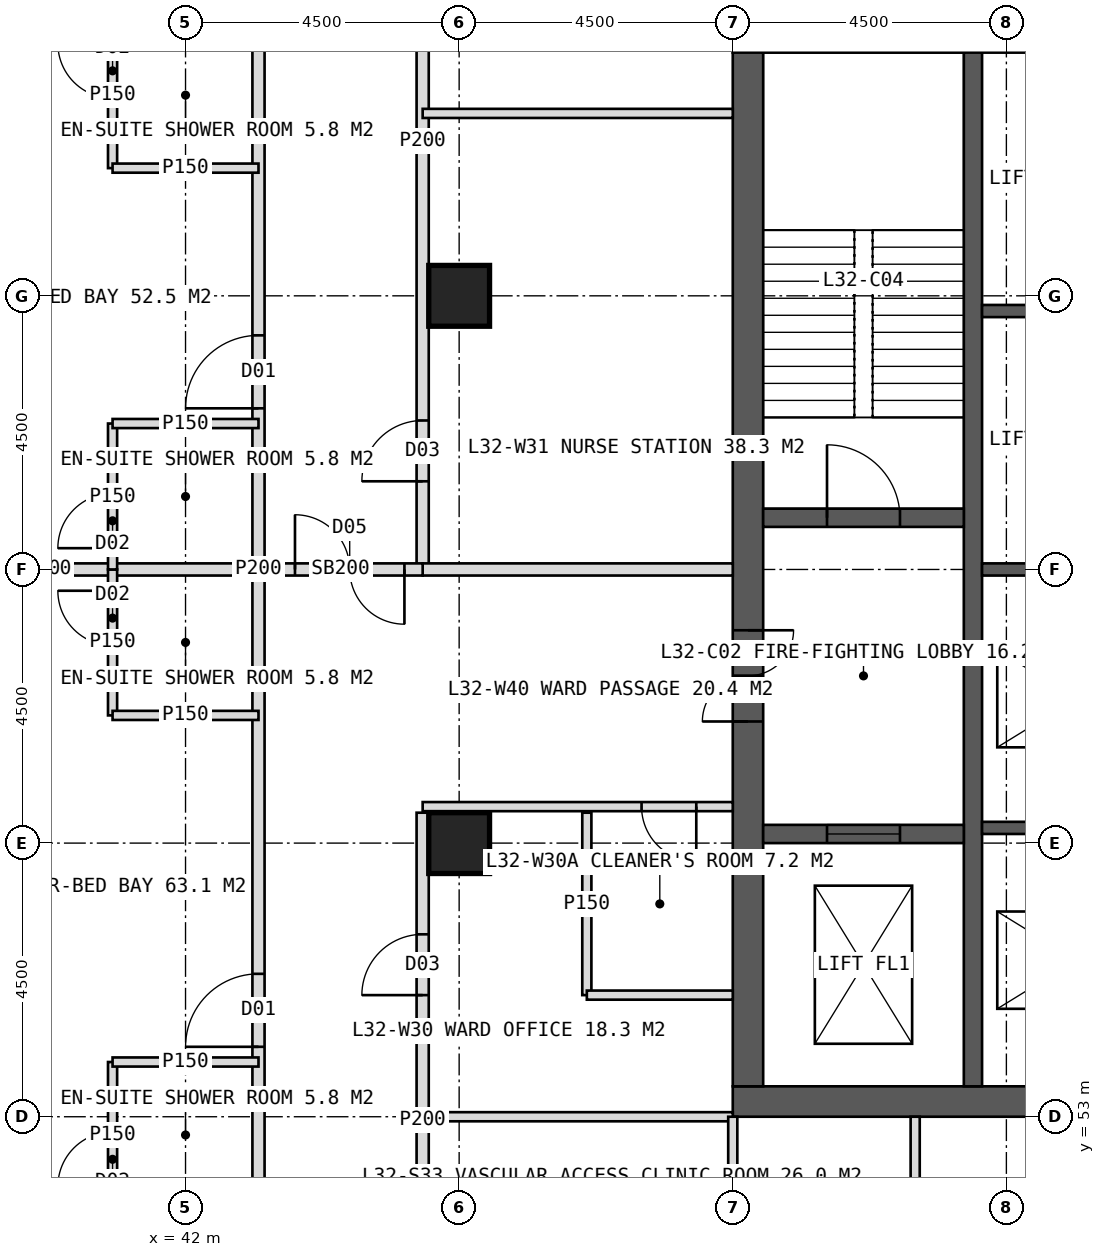
"""IFC4 building model, lengths in metres.
Left out: names, types, materials, properties, quantities, classifications, styles, units other than length and angle.
Written with IfcOpenShell. Run it as: python <this file> out.ifc"""

import sys

from ifc_helpers import new_model, si_unit, direction, frame, frame_2d, origin, origin_2d, place, context, subcontext, project, spatial, rectangle, hollow_rectangle, extrude, element, fill, save


model = new_model("IFC4")
c1 = context("Model", 3, precision=1e-05, world=origin(), true_north=direction((0.0, 1.0)))
c2 = subcontext(c1, "Body", "Model", "MODEL_VIEW")
j1 = project(units=[si_unit("LENGTHUNIT", "METRE"), si_unit("PLANEANGLEUNIT", "RADIAN")], contexts=[c1])
p1 = place(None, origin())
s1 = spatial("IfcSite", under=j1, at=p1, CompositionType="ELEMENT")
p2 = place(p1, origin())
s2 = spatial("IfcBuilding", under=s1, at=p2, CompositionType="ELEMENT")
p3 = place(p2, frame((0.0, 0.0, 136.0)))
s3 = spatial("IfcBuildingStorey", under=s2, at=p3, CompositionType="ELEMENT", Elevation=136.0)
p4 = place(p3, frame((51.0, 53.25, 0.0), z_axis=(0.0, 0.0, 1.0), x_axis=(1.0, 0.0, 0.0)))
e1 = element("IfcWall", 1, at=p4, inside=s3, PredefinedType="SHEAR", context=c2, shape_type="SweptSolid", body=[
    extrude(rectangle(XDim=18.0, YDim=0.5, at=frame_2d((9.0, 0.0))), origin(), (0.0, 0.0, 1.0), 4.0),
])
p5 = place(p4, frame((8.1, 0.0, 0.0)))
e2 = element("IfcOpeningElement", 2, at=p5, cuts=e1, PredefinedType="OPENING", context=c2, shape_type="SweptSolid", body=[
    extrude(rectangle(XDim=1.8, YDim=2.2, at=frame_2d((0.9, 1.1))), frame((0.0, 0.26, 0.0), z_axis=(0.0, -1.0, 0.0), x_axis=(1.0, 0.0, 0.0)), (0.0, 0.0, 1.0), 0.52),
])
p6 = place(p3, frame((51.25, 53.5, 0.0), z_axis=(0.0, 0.0, 1.0), x_axis=(0.0, 1.0, 0.0)))
e3 = element("IfcWall", 3, at=p6, inside=s3, PredefinedType="SHEAR", context=c2, shape_type="SweptSolid", body=[
    extrude(rectangle(XDim=17.0, YDim=0.5, at=frame_2d((8.5, 0.0))), origin(), (0.0, 0.0, 1.0), 4.0),
])
p7 = place(p6, frame((6.0, 0.0, 0.0)))
e4 = element("IfcOpeningElement", 4, at=p7, cuts=e3, PredefinedType="OPENING", context=c2, shape_type="SweptSolid", body=[
    extrude(rectangle(XDim=1.5, YDim=2.2, at=frame_2d((0.75, 1.1))), frame((0.0, 0.26, 0.0), z_axis=(0.0, -1.0, 0.0), x_axis=(1.0, 0.0, 0.0)), (0.0, 0.0, 1.0), 0.52),
])
p8 = place(p3, frame((54.95, 53.5, 0.0), z_axis=(0.0, 0.0, 1.0), x_axis=(0.0, 1.0, 0.0)))
e5 = element("IfcWall", 5, at=p8, inside=s3, PredefinedType="SHEAR", context=c2, shape_type="SweptSolid", body=[
    extrude(rectangle(XDim=17.0, YDim=0.3, at=frame_2d((8.5, 0.0))), origin(), (0.0, 0.0, 1.0), 4.0),
])
for number, where, z_axis, x_axis in (
    (6, (55.1, 57.75, 0.0), (0.0, 0.0, 1.0), (1.0, 0.0, 0.0)),
    (7, (55.1, 62.0, 0.0), (0.0, 0.0, 1.0), (1.0, 0.0, 0.0)),
    (8, (55.1, 66.25, 0.0), (0.0, 0.0, 1.0), (1.0, 0.0, 0.0)),
):
    element("IfcWall", number, at=place(p3, frame(where, z_axis=z_axis, x_axis=x_axis)), inside=s3, PredefinedType="SHEAR", context=c2, shape_type="SweptSolid", body=[
        extrude(rectangle(XDim=3.05, YDim=0.2, at=frame_2d((1.525, 0.0))), origin(), (0.0, 0.0, 1.0), 4.0),
    ])
p9 = place(p3, frame((51.5, 62.85, 0.0), z_axis=(0.0, 0.0, 1.0), x_axis=(1.0, 0.0, 0.0)))
e9 = element("IfcWall", 9, at=p9, inside=s3, PredefinedType="SHEAR", context=c2, shape_type="SweptSolid", body=[
    extrude(rectangle(XDim=3.3, YDim=0.3, at=frame_2d((1.65, 0.0))), origin(), (0.0, 0.0, 1.0), 4.0),
])
p10 = place(p9, frame((1.05, 0.0, 0.0)))
e10 = element("IfcOpeningElement", 10, at=p10, cuts=e9, PredefinedType="OPENING", context=c2, shape_type="SweptSolid", body=[
    extrude(rectangle(XDim=1.2, YDim=2.1, at=frame_2d((0.6, 1.05))), frame((0.0, 0.16, 0.0), z_axis=(0.0, -1.0, 0.0), x_axis=(1.0, 0.0, 0.0)), (0.0, 0.0, 1.0), 0.32),
])
p11 = place(p3, frame((51.5, 57.65, 0.0), z_axis=(0.0, 0.0, 1.0), x_axis=(1.0, 0.0, 0.0)))
e11 = element("IfcWall", 11, at=p11, inside=s3, PredefinedType="SHEAR", context=c2, shape_type="SweptSolid", body=[
    extrude(rectangle(XDim=3.3, YDim=0.3, at=frame_2d((1.65, 0.0))), origin(), (0.0, 0.0, 1.0), 4.0),
])
p12 = place(p11, frame((1.05, 0.0, 0.0)))
e12 = element("IfcOpeningElement", 12, at=p12, cuts=e11, PredefinedType="OPENING", context=c2, shape_type="SweptSolid", body=[
    extrude(rectangle(XDim=1.2, YDim=2.2, at=frame_2d((0.6, 1.1))), frame((0.0, 0.16, 0.0), z_axis=(0.0, -1.0, 0.0), x_axis=(1.0, 0.0, 0.0)), (0.0, 0.0, 1.0), 0.32),
])
for number, where, z_axis, x_axis in (
    (13, (46.5, 57.5, 0.0), (0.0, 0.0, 1.0), (1.0, 0.0, 0.0)),
    (14, (46.5, 66.5, 0.0), (0.0, 0.0, 1.0), (1.0, 0.0, 0.0)),
):
    element("IfcColumn", number, at=place(p3, frame(where, z_axis=z_axis, x_axis=x_axis)), inside=s3, PredefinedType="COLUMN", context=c2, shape_type="SweptSolid", body=[
        extrude(hollow_rectangle(XDim=1.0, YDim=1.0, WallThickness=0.1, at=origin_2d()), origin(), (0.0, 0.0, 1.0), 4.0),
    ])
p13 = place(p3, frame((43.2, 62.0, 0.0), z_axis=(0.0, 0.0, 1.0), x_axis=(-1.0, 0.0, 0.0)))
e15 = element("IfcWall", 15, at=p13, inside=s3, PredefinedType="SOLIDWALL", context=c2, shape_type="SweptSolid", body=[
    extrude(rectangle(XDim=7.11, YDim=0.2, at=frame_2d((3.555, 0.0))), origin(), (0.0, 0.0, 1.0), 2.95),
])
p14 = place(p3, frame((43.2, 45.2, 0.0), z_axis=(0.0, 0.0, 1.0), x_axis=(0.0, 1.0, 0.0)))
e16 = element("IfcWall", 16, at=p14, inside=s3, PredefinedType="PARTITIONING", context=c2, shape_type="SweptSolid", body=[
    extrude(rectangle(XDim=33.6, YDim=0.2, at=frame_2d((16.8, 0.0))), origin(), (0.0, 0.0, 1.0), 3.75),
])
p15 = place(p14, frame((2.65, 0.0, 0.0)))
e17 = element("IfcOpeningElement", 17, at=p15, cuts=e16, PredefinedType="OPENING", context=c2, shape_type="SweptSolid", body=[
    extrude(rectangle(XDim=1.2, YDim=2.2, at=frame_2d((0.6, 1.1))), frame((0.0, 0.11, 0.0), z_axis=(0.0, -1.0, 0.0), x_axis=(1.0, 0.0, 0.0)), (0.0, 0.0, 1.0), 0.22),
])
p16 = place(p14, frame((8.95, 0.0, 0.0)))
e18 = element("IfcOpeningElement", 18, at=p16, cuts=e16, PredefinedType="OPENING", context=c2, shape_type="SweptSolid", body=[
    extrude(rectangle(XDim=1.2, YDim=2.2, at=frame_2d((0.6, 1.1))), frame((0.0, 0.11, 0.0), z_axis=(0.0, -1.0, 0.0), x_axis=(1.0, 0.0, 0.0)), (0.0, 0.0, 1.0), 0.22),
])
p17 = place(p14, frame((19.45, 0.0, 0.0)))
e19 = element("IfcOpeningElement", 19, at=p17, cuts=e16, PredefinedType="OPENING", context=c2, shape_type="SweptSolid", body=[
    extrude(rectangle(XDim=1.2, YDim=2.2, at=frame_2d((0.6, 1.1))), frame((0.0, 0.11, 0.0), z_axis=(0.0, -1.0, 0.0), x_axis=(1.0, 0.0, 0.0)), (0.0, 0.0, 1.0), 0.22),
])
p18 = place(p14, frame((28.45, 0.0, 0.0)))
e20 = element("IfcOpeningElement", 20, at=p18, cuts=e16, PredefinedType="OPENING", context=c2, shape_type="SweptSolid", body=[
    extrude(rectangle(XDim=1.2, YDim=2.2, at=frame_2d((0.6, 1.1))), frame((0.0, 0.11, 0.0), z_axis=(0.0, -1.0, 0.0), x_axis=(1.0, 0.0, 0.0)), (0.0, 0.0, 1.0), 0.22),
])
p19 = place(p3, frame((40.8, 51.5, 0.0), z_axis=(0.0, 0.0, 1.0), x_axis=(0.0, 1.0, 0.0)))
e21 = element("IfcWall", 21, at=p19, inside=s3, PredefinedType="PARTITIONING", context=c2, shape_type="SweptSolid", body=[
    extrude(rectangle(XDim=2.4, YDim=0.15, at=frame_2d((1.2, 0.0))), origin(), (0.0, 0.0, 1.0), 3.75),
])
p20 = place(p19, frame((0.35, 0.0, 0.0)))
e22 = element("IfcOpeningElement", 22, at=p20, cuts=e21, PredefinedType="OPENING", context=c2, shape_type="SweptSolid", body=[
    extrude(rectangle(XDim=0.9, YDim=2.1, at=frame_2d((0.45, 1.05))), frame((0.0, 0.085, 0.0), z_axis=(0.0, -1.0, 0.0), x_axis=(1.0, 0.0, 0.0)), (0.0, 0.0, 1.0), 0.17),
])
p21 = place(p3, frame((43.2, 53.9, 0.0), z_axis=(0.0, 0.0, 1.0), x_axis=(-1.0, 0.0, 0.0)))
e23 = element("IfcWall", 23, at=p21, inside=s3, PredefinedType="PARTITIONING", context=c2, shape_type="SweptSolid", body=[
    extrude(rectangle(XDim=2.4, YDim=0.15, at=frame_2d((1.2, 0.0))), origin(), (0.0, 0.0, 1.0), 3.75),
])
p22 = place(p3, frame((40.8, 59.6, 0.0), z_axis=(0.0, 0.0, 1.0), x_axis=(0.0, 1.0, 0.0)))
e24 = element("IfcWall", 24, at=p22, inside=s3, PredefinedType="PARTITIONING", context=c2, shape_type="SweptSolid", body=[
    extrude(rectangle(XDim=2.4, YDim=0.15, at=frame_2d((1.2, 0.0))), origin(), (0.0, 0.0, 1.0), 3.75),
])
p23 = place(p22, frame((1.15, 0.0, 0.0)))
e25 = element("IfcOpeningElement", 25, at=p23, cuts=e24, PredefinedType="OPENING", context=c2, shape_type="SweptSolid", body=[
    extrude(rectangle(XDim=0.9, YDim=2.1, at=frame_2d((0.45, 1.05))), frame((0.0, 0.085, 0.0), z_axis=(0.0, -1.0, 0.0), x_axis=(1.0, 0.0, 0.0)), (0.0, 0.0, 1.0), 0.17),
])
p24 = place(p3, frame((43.2, 59.6, 0.0), z_axis=(0.0, 0.0, 1.0), x_axis=(-1.0, 0.0, 0.0)))
e26 = element("IfcWall", 26, at=p24, inside=s3, PredefinedType="PARTITIONING", context=c2, shape_type="SweptSolid", body=[
    extrude(rectangle(XDim=2.4, YDim=0.15, at=frame_2d((1.2, 0.0))), origin(), (0.0, 0.0, 1.0), 3.75),
])
p25 = place(p3, frame((40.8, 62.0, 0.0), z_axis=(0.0, 0.0, 1.0), x_axis=(0.0, 1.0, 0.0)))
e27 = element("IfcWall", 27, at=p25, inside=s3, PredefinedType="PARTITIONING", context=c2, shape_type="SweptSolid", body=[
    extrude(rectangle(XDim=2.4, YDim=0.15, at=frame_2d((1.2, 0.0))), origin(), (0.0, 0.0, 1.0), 3.75),
])
p26 = place(p25, frame((0.35, 0.0, 0.0)))
e28 = element("IfcOpeningElement", 28, at=p26, cuts=e27, PredefinedType="OPENING", context=c2, shape_type="SweptSolid", body=[
    extrude(rectangle(XDim=0.9, YDim=2.1, at=frame_2d((0.45, 1.05))), frame((0.0, 0.085, 0.0), z_axis=(0.0, -1.0, 0.0), x_axis=(1.0, 0.0, 0.0)), (0.0, 0.0, 1.0), 0.17),
])
p27 = place(p3, frame((43.2, 64.4, 0.0), z_axis=(0.0, 0.0, 1.0), x_axis=(-1.0, 0.0, 0.0)))
e29 = element("IfcWall", 29, at=p27, inside=s3, PredefinedType="PARTITIONING", context=c2, shape_type="SweptSolid", body=[
    extrude(rectangle(XDim=2.4, YDim=0.15, at=frame_2d((1.2, 0.0))), origin(), (0.0, 0.0, 1.0), 3.75),
])
p28 = place(p3, frame((40.8, 68.6, 0.0), z_axis=(0.0, 0.0, 1.0), x_axis=(0.0, 1.0, 0.0)))
e30 = element("IfcWall", 30, at=p28, inside=s3, PredefinedType="PARTITIONING", context=c2, shape_type="SweptSolid", body=[
    extrude(rectangle(XDim=2.4, YDim=0.15, at=frame_2d((1.2, 0.0))), origin(), (0.0, 0.0, 1.0), 3.75),
])
p29 = place(p28, frame((1.15, 0.0, 0.0)))
e31 = element("IfcOpeningElement", 31, at=p29, cuts=e30, PredefinedType="OPENING", context=c2, shape_type="SweptSolid", body=[
    extrude(rectangle(XDim=0.9, YDim=2.1, at=frame_2d((0.45, 1.05))), frame((0.0, 0.085, 0.0), z_axis=(0.0, -1.0, 0.0), x_axis=(1.0, 0.0, 0.0)), (0.0, 0.0, 1.0), 0.17),
])
p30 = place(p3, frame((43.2, 68.6, 0.0), z_axis=(0.0, 0.0, 1.0), x_axis=(-1.0, 0.0, 0.0)))
e32 = element("IfcWall", 32, at=p30, inside=s3, PredefinedType="PARTITIONING", context=c2, shape_type="SweptSolid", body=[
    extrude(rectangle(XDim=2.4, YDim=0.15, at=frame_2d((1.2, 0.0))), origin(), (0.0, 0.0, 1.0), 3.75),
])
p31 = place(p3, frame((51.0, 53.0, 0.0), z_axis=(0.0, 0.0, 1.0), x_axis=(-1.0, 0.0, 0.0)))
e33 = element("IfcWall", 33, at=p31, inside=s3, PredefinedType="PARTITIONING", context=c2, shape_type="SweptSolid", body=[
    extrude(rectangle(XDim=5.1, YDim=0.15, at=frame_2d((2.55, 0.0))), origin(), (0.0, 0.0, 1.0), 3.75),
])
p32 = place(p3, frame((45.9, 47.9, 0.0), z_axis=(0.0, 0.0, 1.0), x_axis=(0.0, 1.0, 0.0)))
e34 = element("IfcWall", 34, at=p32, inside=s3, PredefinedType="PARTITIONING", context=c2, shape_type="SweptSolid", body=[
    extrude(rectangle(XDim=10.1, YDim=0.2, at=frame_2d((5.05, 0.0))), origin(), (0.0, 0.0, 1.0), 3.75),
])
p33 = place(p32, frame((7.1, 0.0, 0.0)))
e35 = element("IfcOpeningElement", 35, at=p33, cuts=e34, PredefinedType="OPENING", context=c2, shape_type="SweptSolid", body=[
    extrude(rectangle(XDim=1.0, YDim=2.1, at=frame_2d((0.5, 1.05))), frame((0.0, 0.11, 0.0), z_axis=(0.0, -1.0, 0.0), x_axis=(1.0, 0.0, 0.0)), (0.0, 0.0, 1.0), 0.22),
])
p34 = place(p3, frame((45.9, 62.0, 0.0), z_axis=(0.0, 0.0, 1.0), x_axis=(0.0, 1.0, 0.0)))
e36 = element("IfcWall", 36, at=p34, inside=s3, PredefinedType="PARTITIONING", context=c2, shape_type="SweptSolid", body=[
    extrude(rectangle(XDim=14.1, YDim=0.2, at=frame_2d((7.05, 0.0))), origin(), (0.0, 0.0, 1.0), 3.75),
])
p35 = place(p34, frame((1.45, 0.0, 0.0)))
e37 = element("IfcOpeningElement", 37, at=p35, cuts=e36, PredefinedType="OPENING", context=c2, shape_type="SweptSolid", body=[
    extrude(rectangle(XDim=1.0, YDim=2.1, at=frame_2d((0.5, 1.05))), frame((0.0, 0.11, 0.0), z_axis=(0.0, -1.0, 0.0), x_axis=(1.0, 0.0, 0.0)), (0.0, 0.0, 1.0), 0.22),
])
p36 = place(p34, frame((10.3, 0.0, 0.0)))
e38 = element("IfcOpeningElement", 38, at=p36, cuts=e36, PredefinedType="OPENING", context=c2, shape_type="SweptSolid", body=[
    extrude(rectangle(XDim=1.0, YDim=2.1, at=frame_2d((0.5, 1.05))), frame((0.0, 0.11, 0.0), z_axis=(0.0, -1.0, 0.0), x_axis=(1.0, 0.0, 0.0)), (0.0, 0.0, 1.0), 0.22),
])
p37 = place(p3, frame((51.0, 58.1, 0.0), z_axis=(0.0, 0.0, 1.0), x_axis=(-1.0, 0.0, 0.0)))
e39 = element("IfcWall", 39, at=p37, inside=s3, PredefinedType="PARTITIONING", context=c2, shape_type="SweptSolid", body=[
    extrude(rectangle(XDim=5.1, YDim=0.15, at=frame_2d((2.55, 0.0))), origin(), (0.0, 0.0, 1.0), 3.75),
])
p38 = place(p37, frame((0.6, 0.0, 0.0)))
e40 = element("IfcOpeningElement", 40, at=p38, cuts=e39, PredefinedType="OPENING", context=c2, shape_type="SweptSolid", body=[
    extrude(rectangle(XDim=0.9, YDim=2.1, at=frame_2d((0.45, 1.05))), frame((0.0, 0.085, 0.0), z_axis=(0.0, -1.0, 0.0), x_axis=(1.0, 0.0, 0.0)), (0.0, 0.0, 1.0), 0.17),
])
p39 = place(p3, frame((51.0, 62.0, 0.0), z_axis=(0.0, 0.0, 1.0), x_axis=(-1.0, 0.0, 0.0)))
e41 = element("IfcWall", 41, at=p39, inside=s3, PredefinedType="SOLIDWALL", context=c2, shape_type="SweptSolid", body=[
    extrude(rectangle(XDim=5.1, YDim=0.2, at=frame_2d((2.55, 0.0))), origin(), (0.0, 0.0, 1.0), 2.95),
])
p40 = place(p3, frame((51.0, 69.5, 0.0), z_axis=(0.0, 0.0, 1.0), x_axis=(-1.0, 0.0, 0.0)))
e42 = element("IfcWall", 42, at=p40, inside=s3, PredefinedType="PARTITIONING", context=c2, shape_type="SweptSolid", body=[
    extrude(rectangle(XDim=5.1, YDim=0.15, at=frame_2d((2.55, 0.0))), origin(), (0.0, 0.0, 1.0), 3.75),
])
p41 = place(p3, frame((48.6, 55.0, 0.0), z_axis=(0.0, 0.0, 1.0), x_axis=(0.0, 1.0, 0.0)))
e43 = element("IfcWall", 43, at=p41, inside=s3, PredefinedType="PARTITIONING", context=c2, shape_type="SweptSolid", body=[
    extrude(rectangle(XDim=3.0, YDim=0.15, at=frame_2d((1.5, 0.0))), origin(), (0.0, 0.0, 1.0), 3.75),
])
p42 = place(p3, frame((51.0, 55.0, 0.0), z_axis=(0.0, 0.0, 1.0), x_axis=(-1.0, 0.0, 0.0)))
e44 = element("IfcWall", 44, at=p42, inside=s3, PredefinedType="PARTITIONING", context=c2, shape_type="SweptSolid", body=[
    extrude(rectangle(XDim=2.4, YDim=0.15, at=frame_2d((1.2, 0.0))), origin(), (0.0, 0.0, 1.0), 3.75),
])
for number, where, z_axis, x_axis in (
    (45, (54.0, 53.0, 0.0), (0.0, 0.0, 1.0), (0.0, -1.0, 0.0)),
    (46, (51.0, 53.0, 0.0), (0.0, 0.0, 1.0), (0.0, -1.0, 0.0)),
):
    element("IfcWall", number, at=place(p3, frame(where, z_axis=z_axis, x_axis=x_axis)), inside=s3, PredefinedType="PARTITIONING", context=c2, shape_type="SweptSolid", body=[
        extrude(rectangle(XDim=5.1, YDim=0.15, at=frame_2d((2.55, 0.0))), origin(), (0.0, 0.0, 1.0), 3.75),
    ])
p43 = place(p3, frame((45.9, 62.0, 0.0), z_axis=(0.0, 0.0, 1.0), x_axis=(-1.0, 0.0, 0.0)))
e47 = element("IfcWall", 47, at=p43, inside=s3, PredefinedType="SOLIDWALL", context=c2, shape_type="SweptSolid", body=[
    extrude(rectangle(XDim=2.7, YDim=0.2, at=frame_2d((1.35, 0.0))), origin(), (0.0, 0.0, 1.0), 2.95),
])
p44 = place(p43, frame((0.3, 0.0, 0.0)))
e48 = element("IfcOpeningElement", 48, at=p44, cuts=e47, PredefinedType="OPENING", context=c2, shape_type="SweptSolid", body=[
    extrude(rectangle(XDim=1.8, YDim=2.2, at=frame_2d((0.9, 1.1))), frame((0.0, 0.11, 0.0), z_axis=(0.0, -1.0, 0.0), x_axis=(1.0, 0.0, 0.0)), (0.0, 0.0, 1.0), 0.22),
])
p45 = place(p16, origin())
e49 = element("IfcDoor", 49, at=p45, inside=s3, OperationType="SINGLE_SWING_LEFT", PredefinedType="DOOR", context=c2, shape_type="SweptSolid", body=[
    extrude(rectangle(XDim=1.2, YDim=2.2, at=frame_2d((0.6, 1.1))), frame((0.0, 0.025, 0.0), z_axis=(0.0, -1.0, 0.0), x_axis=(1.0, 0.0, 0.0)), (0.0, 0.0, 1.0), 0.05),
])
fill(e18, e49)
p46 = place(p20, origin())
e50 = element("IfcDoor", 50, at=p46, inside=s3, OperationType="SINGLE_SWING_LEFT", PredefinedType="DOOR", context=c2, shape_type="SweptSolid", body=[
    extrude(rectangle(XDim=0.9, YDim=2.1, at=frame_2d((0.45, 1.05))), frame((0.0, 0.025, 0.0), z_axis=(0.0, -1.0, 0.0), x_axis=(1.0, 0.0, 0.0)), (0.0, 0.0, 1.0), 0.05),
])
fill(e22, e50)
p47 = place(p23, origin())
e51 = element("IfcDoor", 51, at=p47, inside=s3, OperationType="SINGLE_SWING_RIGHT", PredefinedType="DOOR", context=c2, shape_type="SweptSolid", body=[
    extrude(rectangle(XDim=0.9, YDim=2.1, at=frame_2d((0.45, 1.05))), frame((0.0, 0.025, 0.0), z_axis=(0.0, -1.0, 0.0), x_axis=(1.0, 0.0, 0.0)), (0.0, 0.0, 1.0), 0.05),
])
fill(e25, e51)
p48 = place(p17, origin())
e52 = element("IfcDoor", 52, at=p48, inside=s3, OperationType="SINGLE_SWING_LEFT", PredefinedType="DOOR", context=c2, shape_type="SweptSolid", body=[
    extrude(rectangle(XDim=1.2, YDim=2.2, at=frame_2d((0.6, 1.1))), frame((0.0, 0.025, 0.0), z_axis=(0.0, -1.0, 0.0), x_axis=(1.0, 0.0, 0.0)), (0.0, 0.0, 1.0), 0.05),
])
fill(e19, e52)
p49 = place(p26, origin())
e53 = element("IfcDoor", 53, at=p49, inside=s3, OperationType="SINGLE_SWING_LEFT", PredefinedType="DOOR", context=c2, shape_type="SweptSolid", body=[
    extrude(rectangle(XDim=0.9, YDim=2.1, at=frame_2d((0.45, 1.05))), frame((0.0, 0.025, 0.0), z_axis=(0.0, -1.0, 0.0), x_axis=(1.0, 0.0, 0.0)), (0.0, 0.0, 1.0), 0.05),
])
fill(e28, e53)
p50 = place(p29, origin())
e54 = element("IfcDoor", 54, at=p50, inside=s3, OperationType="SINGLE_SWING_RIGHT", PredefinedType="DOOR", context=c2, shape_type="SweptSolid", body=[
    extrude(rectangle(XDim=0.9, YDim=2.1, at=frame_2d((0.45, 1.05))), frame((0.0, 0.025, 0.0), z_axis=(0.0, -1.0, 0.0), x_axis=(1.0, 0.0, 0.0)), (0.0, 0.0, 1.0), 0.05),
])
fill(e31, e54)
p51 = place(p38, origin())
e55 = element("IfcDoor", 55, at=p51, inside=s3, OperationType="SINGLE_SWING_LEFT", PredefinedType="DOOR", context=c2, shape_type="SweptSolid", body=[
    extrude(rectangle(XDim=0.9, YDim=2.1, at=frame_2d((0.45, 1.05))), frame((0.0, 0.025, 0.0), z_axis=(0.0, -1.0, 0.0), x_axis=(1.0, 0.0, 0.0)), (0.0, 0.0, 1.0), 0.05),
])
fill(e40, e55)
p52 = place(p33, origin())
e56 = element("IfcDoor", 56, at=p52, inside=s3, OperationType="SINGLE_SWING_LEFT", PredefinedType="DOOR", context=c2, shape_type="SweptSolid", body=[
    extrude(rectangle(XDim=1.0, YDim=2.1, at=frame_2d((0.5, 1.05))), frame((0.0, 0.025, 0.0), z_axis=(0.0, -1.0, 0.0), x_axis=(1.0, 0.0, 0.0)), (0.0, 0.0, 1.0), 0.05),
])
fill(e35, e56)
p53 = place(p35, origin())
e57 = element("IfcDoor", 57, at=p53, inside=s3, OperationType="SINGLE_SWING_LEFT", PredefinedType="DOOR", context=c2, shape_type="SweptSolid", body=[
    extrude(rectangle(XDim=1.0, YDim=2.1, at=frame_2d((0.5, 1.05))), frame((0.0, 0.025, 0.0), z_axis=(0.0, -1.0, 0.0), x_axis=(1.0, 0.0, 0.0)), (0.0, 0.0, 1.0), 0.05),
])
fill(e37, e57)
p54 = place(p44, origin())
e58 = element("IfcDoor", 58, at=p54, inside=s3, OperationType="DOUBLE_DOOR_DOUBLE_SWING", PredefinedType="DOOR", context=c2, shape_type="SweptSolid", body=[
    extrude(rectangle(XDim=1.8, YDim=2.2, at=frame_2d((0.9, 1.1))), frame((0.0, 0.025, 0.0), z_axis=(0.0, -1.0, 0.0), x_axis=(1.0, 0.0, 0.0)), (0.0, 0.0, 1.0), 0.05),
])
fill(e48, e58)
p55 = place(p7, origin())
e59 = element("IfcDoor", 59, at=p55, inside=s3, OperationType="DOUBLE_DOOR_SINGLE_SWING", PredefinedType="DOOR", context=c2, shape_type="SweptSolid", body=[
    extrude(rectangle(XDim=1.5, YDim=2.2, at=frame_2d((0.75, 1.1))), frame((0.0, 0.025, 0.0), z_axis=(0.0, -1.0, 0.0), x_axis=(1.0, 0.0, 0.0)), (0.0, 0.0, 1.0), 0.05),
])
fill(e4, e59)
p56 = place(p10, origin())
e60 = element("IfcDoor", 60, at=p56, inside=s3, OperationType="SINGLE_SWING_LEFT", PredefinedType="DOOR", context=c2, shape_type="SweptSolid", body=[
    extrude(rectangle(XDim=1.2, YDim=2.1, at=frame_2d((0.6, 1.05))), frame((0.0, 0.025, 0.0), z_axis=(0.0, -1.0, 0.0), x_axis=(1.0, 0.0, 0.0)), (0.0, 0.0, 1.0), 0.05),
])
fill(e10, e60)
p57 = place(p12, origin())
e61 = element("IfcDoor", 61, at=p57, inside=s3, OperationType="SLIDING_TO_LEFT", PredefinedType="DOOR", context=c2, shape_type="SweptSolid", body=[
    extrude(rectangle(XDim=1.2, YDim=2.2, at=frame_2d((0.6, 1.1))), frame((0.0, 0.025, 0.0), z_axis=(0.0, -1.0, 0.0), x_axis=(1.0, 0.0, 0.0)), (0.0, 0.0, 1.0), 0.05),
])
fill(e12, e61)
save(model, sys.argv[1])
